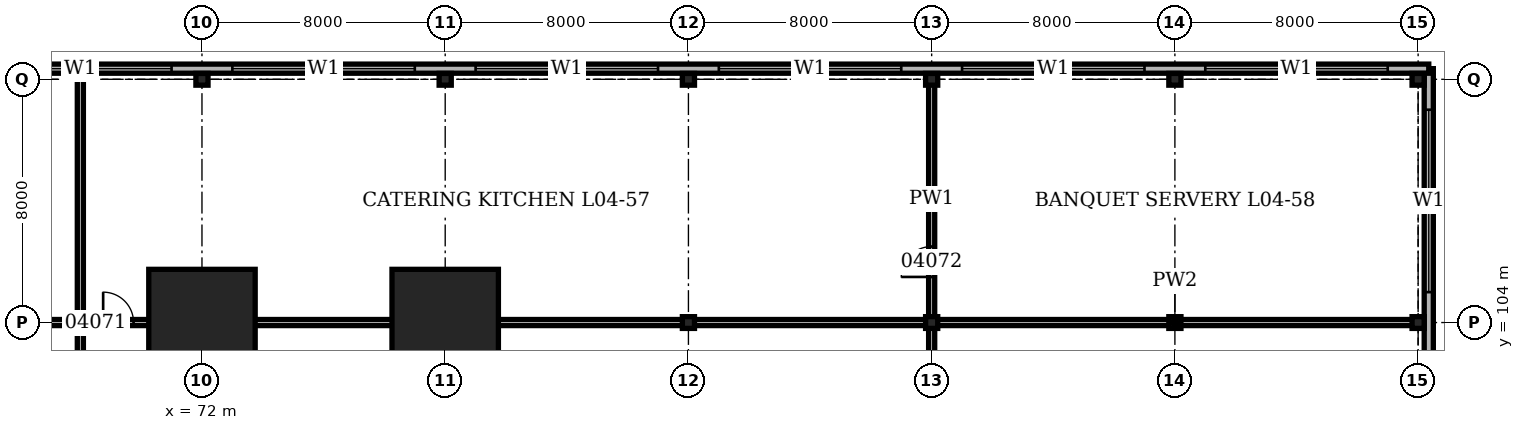
"""IFC4 building model, lengths in metres.
Left out: names, types, materials, properties, quantities, classifications, styles, units other than length and angle.
Written with IfcOpenShell. Run it as: python <this file> out.ifc"""

import sys

from ifc_helpers import new_model, si_unit, direction, frame, frame_2d, origin, origin_2d, place, context, subcontext, project, spatial, rectangle, hollow_rectangle, i_section, extrude, element, fill, save


model = new_model("IFC4")
c1 = context("Model", 3, precision=1e-05, world=origin(), true_north=direction((0.0, 1.0)))
c2 = subcontext(c1, "Body", "Model", "MODEL_VIEW")
j1 = project(units=[si_unit("LENGTHUNIT", "METRE"), si_unit("PLANEANGLEUNIT", "RADIAN")], contexts=[c1])
p1 = place(None, origin())
s1 = spatial("IfcSite", under=j1, at=p1, CompositionType="ELEMENT")
p2 = place(p1, origin())
s2 = spatial("IfcBuilding", under=s1, at=p2, CompositionType="ELEMENT")
p3 = place(p2, frame((0.0, 0.0, 19.9)))
s3 = spatial("IfcBuildingStorey", under=s2, at=p3, CompositionType="ELEMENT", Elevation=19.9)
p4 = place(p3, frame((72.0, 104.0, 0.0), z_axis=(0.0, 0.0, 1.0), x_axis=(1.0, 0.0, 0.0)))
e1 = element("IfcColumn", 1, at=p4, inside=s3, PredefinedType="COLUMN", context=c2, shape_type="SweptSolid", body=[
    extrude(hollow_rectangle(XDim=3.5, YDim=3.5, WallThickness=0.5, at=origin_2d()), origin(), (0.0, 0.0, 1.0), 6.0),
])
p5 = place(p3, frame((72.0, 112.0, 0.0), z_axis=(0.0, 0.0, 1.0), x_axis=(1.0, 0.0, 0.0)))
e2 = element("IfcColumn", 2, at=p5, inside=s3, PredefinedType="COLUMN", context=c2, shape_type="SweptSolid", body=[
    extrude(i_section(OverallWidth=0.399, OverallDepth=0.386, WebThickness=0.021, FlangeThickness=0.033, at=origin_2d()), origin(), (0.0, 0.0, 1.0), 6.0),
])
p6 = place(p3, frame((80.0, 104.0, 0.0), z_axis=(0.0, 0.0, 1.0), x_axis=(1.0, 0.0, 0.0)))
e3 = element("IfcColumn", 3, at=p6, inside=s3, PredefinedType="COLUMN", context=c2, shape_type="SweptSolid", body=[
    extrude(hollow_rectangle(XDim=3.5, YDim=3.5, WallThickness=0.5, at=origin_2d()), origin(), (0.0, 0.0, 1.0), 6.0),
])
for number, where, z_axis, x_axis in (
    (4, (80.0, 112.0, 0.0), (0.0, 0.0, 1.0), (1.0, 0.0, 0.0)),
    (5, (88.0, 104.0, 0.0), (0.0, 0.0, 1.0), (1.0, 0.0, 0.0)),
    (6, (88.0, 112.0, 0.0), (0.0, 0.0, 1.0), (1.0, 0.0, 0.0)),
    (7, (96.0, 104.0, 0.0), (0.0, 0.0, 1.0), (1.0, 0.0, 0.0)),
    (8, (96.0, 112.0, 0.0), (0.0, 0.0, 1.0), (1.0, 0.0, 0.0)),
    (9, (104.0, 104.0, 0.0), (0.0, 0.0, 1.0), (1.0, 0.0, 0.0)),
    (10, (104.0, 112.0, 0.0), (0.0, 0.0, 1.0), (1.0, 0.0, 0.0)),
    (11, (112.0, 104.0, 0.0), (0.0, 0.0, 1.0), (1.0, 0.0, 0.0)),
    (12, (112.0, 112.0, 0.0), (0.0, 0.0, 1.0), (1.0, 0.0, 0.0)),
):
    element("IfcColumn", number, at=place(p3, frame(where, z_axis=z_axis, x_axis=x_axis)), inside=s3, PredefinedType="COLUMN", context=c2, shape_type="SweptSolid", body=[
        extrude(i_section(OverallWidth=0.399, OverallDepth=0.386, WebThickness=0.021, FlangeThickness=0.033, at=origin_2d()), origin(), (0.0, 0.0, 1.0), 6.0),
    ])
p7 = place(p3, frame((112.35, -0.35, 0.0), z_axis=(0.0, 0.0, 1.0), x_axis=(0.0, 1.0, 0.0)))
e13 = element("IfcWall", 13, at=p7, inside=s3, PredefinedType="SOLIDWALL", context=c2, shape_type="SweptSolid", body=[
    extrude(rectangle(XDim=112.7, YDim=0.3, at=frame_2d((56.35, 0.0))), origin(), (0.0, 0.0, 1.0), 6.0),
])
p8 = place(p7, frame((1.35, 0.0, 1.0)))
e14 = element("IfcOpeningElement", 14, at=p8, cuts=e13, PredefinedType="OPENING", context=c2, shape_type="SweptSolid", body=[
    extrude(rectangle(XDim=6.0, YDim=1.5, at=frame_2d((3.0, 0.75))), frame((0.0, 0.16, 0.0), z_axis=(0.0, -1.0, 0.0), x_axis=(1.0, 0.0, 0.0)), (0.0, 0.0, 1.0), 0.32),
])
p9 = place(p7, frame((9.35, 0.0, 1.0)))
e15 = element("IfcOpeningElement", 15, at=p9, cuts=e13, PredefinedType="OPENING", context=c2, shape_type="SweptSolid", body=[
    extrude(rectangle(XDim=6.0, YDim=1.5, at=frame_2d((3.0, 0.75))), frame((0.0, 0.16, 0.0), z_axis=(0.0, -1.0, 0.0), x_axis=(1.0, 0.0, 0.0)), (0.0, 0.0, 1.0), 0.32),
])
p10 = place(p7, frame((17.35, 0.0, 1.0)))
e16 = element("IfcOpeningElement", 16, at=p10, cuts=e13, PredefinedType="OPENING", context=c2, shape_type="SweptSolid", body=[
    extrude(rectangle(XDim=6.0, YDim=1.5, at=frame_2d((3.0, 0.75))), frame((0.0, 0.16, 0.0), z_axis=(0.0, -1.0, 0.0), x_axis=(1.0, 0.0, 0.0)), (0.0, 0.0, 1.0), 0.32),
])
p11 = place(p7, frame((25.35, 0.0, 1.0)))
e17 = element("IfcOpeningElement", 17, at=p11, cuts=e13, PredefinedType="OPENING", context=c2, shape_type="SweptSolid", body=[
    extrude(rectangle(XDim=6.0, YDim=1.5, at=frame_2d((3.0, 0.75))), frame((0.0, 0.16, 0.0), z_axis=(0.0, -1.0, 0.0), x_axis=(1.0, 0.0, 0.0)), (0.0, 0.0, 1.0), 0.32),
])
p12 = place(p7, frame((33.35, 0.0, 1.0)))
e18 = element("IfcOpeningElement", 18, at=p12, cuts=e13, PredefinedType="OPENING", context=c2, shape_type="SweptSolid", body=[
    extrude(rectangle(XDim=6.0, YDim=1.5, at=frame_2d((3.0, 0.75))), frame((0.0, 0.16, 0.0), z_axis=(0.0, -1.0, 0.0), x_axis=(1.0, 0.0, 0.0)), (0.0, 0.0, 1.0), 0.32),
])
p13 = place(p7, frame((41.35, 0.0, 1.0)))
e19 = element("IfcOpeningElement", 19, at=p13, cuts=e13, PredefinedType="OPENING", context=c2, shape_type="SweptSolid", body=[
    extrude(rectangle(XDim=6.0, YDim=1.5, at=frame_2d((3.0, 0.75))), frame((0.0, 0.16, 0.0), z_axis=(0.0, -1.0, 0.0), x_axis=(1.0, 0.0, 0.0)), (0.0, 0.0, 1.0), 0.32),
])
p14 = place(p7, frame((49.35, 0.0, 1.0)))
e20 = element("IfcOpeningElement", 20, at=p14, cuts=e13, PredefinedType="OPENING", context=c2, shape_type="SweptSolid", body=[
    extrude(rectangle(XDim=6.0, YDim=1.5, at=frame_2d((3.0, 0.75))), frame((0.0, 0.16, 0.0), z_axis=(0.0, -1.0, 0.0), x_axis=(1.0, 0.0, 0.0)), (0.0, 0.0, 1.0), 0.32),
])
p15 = place(p7, frame((57.35, 0.0, 1.0)))
e21 = element("IfcOpeningElement", 21, at=p15, cuts=e13, PredefinedType="OPENING", context=c2, shape_type="SweptSolid", body=[
    extrude(rectangle(XDim=6.0, YDim=1.5, at=frame_2d((3.0, 0.75))), frame((0.0, 0.16, 0.0), z_axis=(0.0, -1.0, 0.0), x_axis=(1.0, 0.0, 0.0)), (0.0, 0.0, 1.0), 0.32),
])
p16 = place(p7, frame((65.35, 0.0, 1.0)))
e22 = element("IfcOpeningElement", 22, at=p16, cuts=e13, PredefinedType="OPENING", context=c2, shape_type="SweptSolid", body=[
    extrude(rectangle(XDim=6.0, YDim=1.5, at=frame_2d((3.0, 0.75))), frame((0.0, 0.16, 0.0), z_axis=(0.0, -1.0, 0.0), x_axis=(1.0, 0.0, 0.0)), (0.0, 0.0, 1.0), 0.32),
])
p17 = place(p7, frame((73.35, 0.0, 1.0)))
e23 = element("IfcOpeningElement", 23, at=p17, cuts=e13, PredefinedType="OPENING", context=c2, shape_type="SweptSolid", body=[
    extrude(rectangle(XDim=6.0, YDim=1.5, at=frame_2d((3.0, 0.75))), frame((0.0, 0.16, 0.0), z_axis=(0.0, -1.0, 0.0), x_axis=(1.0, 0.0, 0.0)), (0.0, 0.0, 1.0), 0.32),
])
p18 = place(p7, frame((81.35, 0.0, 1.0)))
e24 = element("IfcOpeningElement", 24, at=p18, cuts=e13, PredefinedType="OPENING", context=c2, shape_type="SweptSolid", body=[
    extrude(rectangle(XDim=6.0, YDim=1.5, at=frame_2d((3.0, 0.75))), frame((0.0, 0.16, 0.0), z_axis=(0.0, -1.0, 0.0), x_axis=(1.0, 0.0, 0.0)), (0.0, 0.0, 1.0), 0.32),
])
p19 = place(p7, frame((89.35, 0.0, 1.0)))
e25 = element("IfcOpeningElement", 25, at=p19, cuts=e13, PredefinedType="OPENING", context=c2, shape_type="SweptSolid", body=[
    extrude(rectangle(XDim=6.0, YDim=1.5, at=frame_2d((3.0, 0.75))), frame((0.0, 0.16, 0.0), z_axis=(0.0, -1.0, 0.0), x_axis=(1.0, 0.0, 0.0)), (0.0, 0.0, 1.0), 0.32),
])
p20 = place(p7, frame((97.35, 0.0, 1.0)))
e26 = element("IfcOpeningElement", 26, at=p20, cuts=e13, PredefinedType="OPENING", context=c2, shape_type="SweptSolid", body=[
    extrude(rectangle(XDim=6.0, YDim=1.5, at=frame_2d((3.0, 0.75))), frame((0.0, 0.16, 0.0), z_axis=(0.0, -1.0, 0.0), x_axis=(1.0, 0.0, 0.0)), (0.0, 0.0, 1.0), 0.32),
])
p21 = place(p7, frame((105.35, 0.0, 1.0)))
e27 = element("IfcOpeningElement", 27, at=p21, cuts=e13, PredefinedType="OPENING", context=c2, shape_type="SweptSolid", body=[
    extrude(rectangle(XDim=6.0, YDim=1.5, at=frame_2d((3.0, 0.75))), frame((0.0, 0.16, 0.0), z_axis=(0.0, -1.0, 0.0), x_axis=(1.0, 0.0, 0.0)), (0.0, 0.0, 1.0), 0.32),
])
p22 = place(p3, frame((112.35, 112.35, 0.0), z_axis=(0.0, 0.0, 1.0), x_axis=(-1.0, 0.0, 0.0)))
e28 = element("IfcWall", 28, at=p22, inside=s3, PredefinedType="SOLIDWALL", context=c2, shape_type="SweptSolid", body=[
    extrude(rectangle(XDim=112.7, YDim=0.3, at=frame_2d((56.35, 0.0))), origin(), (0.0, 0.0, 1.0), 6.0),
])
p23 = place(p22, frame((1.35, 0.0, 1.0)))
e29 = element("IfcOpeningElement", 29, at=p23, cuts=e28, PredefinedType="OPENING", context=c2, shape_type="SweptSolid", body=[
    extrude(rectangle(XDim=6.0, YDim=1.5, at=frame_2d((3.0, 0.75))), frame((0.0, 0.16, 0.0), z_axis=(0.0, -1.0, 0.0), x_axis=(1.0, 0.0, 0.0)), (0.0, 0.0, 1.0), 0.32),
])
p24 = place(p22, frame((9.35, 0.0, 1.0)))
e30 = element("IfcOpeningElement", 30, at=p24, cuts=e28, PredefinedType="OPENING", context=c2, shape_type="SweptSolid", body=[
    extrude(rectangle(XDim=6.0, YDim=1.5, at=frame_2d((3.0, 0.75))), frame((0.0, 0.16, 0.0), z_axis=(0.0, -1.0, 0.0), x_axis=(1.0, 0.0, 0.0)), (0.0, 0.0, 1.0), 0.32),
])
p25 = place(p22, frame((17.35, 0.0, 1.0)))
e31 = element("IfcOpeningElement", 31, at=p25, cuts=e28, PredefinedType="OPENING", context=c2, shape_type="SweptSolid", body=[
    extrude(rectangle(XDim=6.0, YDim=1.5, at=frame_2d((3.0, 0.75))), frame((0.0, 0.16, 0.0), z_axis=(0.0, -1.0, 0.0), x_axis=(1.0, 0.0, 0.0)), (0.0, 0.0, 1.0), 0.32),
])
p26 = place(p22, frame((25.35, 0.0, 1.0)))
e32 = element("IfcOpeningElement", 32, at=p26, cuts=e28, PredefinedType="OPENING", context=c2, shape_type="SweptSolid", body=[
    extrude(rectangle(XDim=6.0, YDim=1.5, at=frame_2d((3.0, 0.75))), frame((0.0, 0.16, 0.0), z_axis=(0.0, -1.0, 0.0), x_axis=(1.0, 0.0, 0.0)), (0.0, 0.0, 1.0), 0.32),
])
p27 = place(p22, frame((33.35, 0.0, 1.0)))
e33 = element("IfcOpeningElement", 33, at=p27, cuts=e28, PredefinedType="OPENING", context=c2, shape_type="SweptSolid", body=[
    extrude(rectangle(XDim=6.0, YDim=1.5, at=frame_2d((3.0, 0.75))), frame((0.0, 0.16, 0.0), z_axis=(0.0, -1.0, 0.0), x_axis=(1.0, 0.0, 0.0)), (0.0, 0.0, 1.0), 0.32),
])
p28 = place(p22, frame((41.35, 0.0, 1.0)))
e34 = element("IfcOpeningElement", 34, at=p28, cuts=e28, PredefinedType="OPENING", context=c2, shape_type="SweptSolid", body=[
    extrude(rectangle(XDim=6.0, YDim=1.5, at=frame_2d((3.0, 0.75))), frame((0.0, 0.16, 0.0), z_axis=(0.0, -1.0, 0.0), x_axis=(1.0, 0.0, 0.0)), (0.0, 0.0, 1.0), 0.32),
])
p29 = place(p22, frame((49.35, 0.0, 1.0)))
e35 = element("IfcOpeningElement", 35, at=p29, cuts=e28, PredefinedType="OPENING", context=c2, shape_type="SweptSolid", body=[
    extrude(rectangle(XDim=6.0, YDim=1.5, at=frame_2d((3.0, 0.75))), frame((0.0, 0.16, 0.0), z_axis=(0.0, -1.0, 0.0), x_axis=(1.0, 0.0, 0.0)), (0.0, 0.0, 1.0), 0.32),
])
p30 = place(p22, frame((57.35, 0.0, 1.0)))
e36 = element("IfcOpeningElement", 36, at=p30, cuts=e28, PredefinedType="OPENING", context=c2, shape_type="SweptSolid", body=[
    extrude(rectangle(XDim=6.0, YDim=1.5, at=frame_2d((3.0, 0.75))), frame((0.0, 0.16, 0.0), z_axis=(0.0, -1.0, 0.0), x_axis=(1.0, 0.0, 0.0)), (0.0, 0.0, 1.0), 0.32),
])
p31 = place(p22, frame((65.35, 0.0, 1.0)))
e37 = element("IfcOpeningElement", 37, at=p31, cuts=e28, PredefinedType="OPENING", context=c2, shape_type="SweptSolid", body=[
    extrude(rectangle(XDim=6.0, YDim=1.5, at=frame_2d((3.0, 0.75))), frame((0.0, 0.16, 0.0), z_axis=(0.0, -1.0, 0.0), x_axis=(1.0, 0.0, 0.0)), (0.0, 0.0, 1.0), 0.32),
])
p32 = place(p22, frame((73.35, 0.0, 1.0)))
e38 = element("IfcOpeningElement", 38, at=p32, cuts=e28, PredefinedType="OPENING", context=c2, shape_type="SweptSolid", body=[
    extrude(rectangle(XDim=6.0, YDim=1.5, at=frame_2d((3.0, 0.75))), frame((0.0, 0.16, 0.0), z_axis=(0.0, -1.0, 0.0), x_axis=(1.0, 0.0, 0.0)), (0.0, 0.0, 1.0), 0.32),
])
p33 = place(p22, frame((81.35, 0.0, 1.0)))
e39 = element("IfcOpeningElement", 39, at=p33, cuts=e28, PredefinedType="OPENING", context=c2, shape_type="SweptSolid", body=[
    extrude(rectangle(XDim=6.0, YDim=1.5, at=frame_2d((3.0, 0.75))), frame((0.0, 0.16, 0.0), z_axis=(0.0, -1.0, 0.0), x_axis=(1.0, 0.0, 0.0)), (0.0, 0.0, 1.0), 0.32),
])
p34 = place(p22, frame((89.35, 0.0, 1.0)))
e40 = element("IfcOpeningElement", 40, at=p34, cuts=e28, PredefinedType="OPENING", context=c2, shape_type="SweptSolid", body=[
    extrude(rectangle(XDim=6.0, YDim=1.5, at=frame_2d((3.0, 0.75))), frame((0.0, 0.16, 0.0), z_axis=(0.0, -1.0, 0.0), x_axis=(1.0, 0.0, 0.0)), (0.0, 0.0, 1.0), 0.32),
])
p35 = place(p22, frame((97.35, 0.0, 1.0)))
e41 = element("IfcOpeningElement", 41, at=p35, cuts=e28, PredefinedType="OPENING", context=c2, shape_type="SweptSolid", body=[
    extrude(rectangle(XDim=6.0, YDim=1.5, at=frame_2d((3.0, 0.75))), frame((0.0, 0.16, 0.0), z_axis=(0.0, -1.0, 0.0), x_axis=(1.0, 0.0, 0.0)), (0.0, 0.0, 1.0), 0.32),
])
p36 = place(p22, frame((105.35, 0.0, 1.0)))
e42 = element("IfcOpeningElement", 42, at=p36, cuts=e28, PredefinedType="OPENING", context=c2, shape_type="SweptSolid", body=[
    extrude(rectangle(XDim=6.0, YDim=1.5, at=frame_2d((3.0, 0.75))), frame((0.0, 0.16, 0.0), z_axis=(0.0, -1.0, 0.0), x_axis=(1.0, 0.0, 0.0)), (0.0, 0.0, 1.0), 0.32),
])
p37 = place(p3, frame((24.1, 104.0, 0.0), z_axis=(0.0, 0.0, 1.0), x_axis=(1.0, 0.0, 0.0)))
e43 = element("IfcWall", 43, at=p37, inside=s3, PredefinedType="PARTITIONING", context=c2, shape_type="SweptSolid", body=[
    extrude(rectangle(XDim=71.9, YDim=0.2, at=frame_2d((35.95, 0.0))), origin(), (0.0, 0.0, 1.0), 4.978),
])
p38 = place(p37, frame((1.0, 0.0, 0.0)))
e44 = element("IfcOpeningElement", 44, at=p38, cuts=e43, PredefinedType="OPENING", context=c2, shape_type="SweptSolid", body=[
    extrude(rectangle(XDim=1.8, YDim=2.4, at=frame_2d((0.9, 1.2))), frame((0.0, 0.11, 0.0), z_axis=(0.0, -1.0, 0.0), x_axis=(1.0, 0.0, 0.0)), (0.0, 0.0, 1.0), 0.22),
])
p39 = place(p37, frame((26.0, 0.0, 0.0)))
e45 = element("IfcOpeningElement", 45, at=p39, cuts=e43, PredefinedType="OPENING", context=c2, shape_type="SweptSolid", body=[
    extrude(rectangle(XDim=1.8, YDim=2.4, at=frame_2d((0.9, 1.2))), frame((0.0, 0.11, 0.0), z_axis=(0.0, -1.0, 0.0), x_axis=(1.0, 0.0, 0.0)), (0.0, 0.0, 1.0), 0.22),
])
p40 = place(p37, frame((34.0, 0.0, 0.0)))
e46 = element("IfcOpeningElement", 46, at=p40, cuts=e43, PredefinedType="OPENING", context=c2, shape_type="SweptSolid", body=[
    extrude(rectangle(XDim=1.8, YDim=2.4, at=frame_2d((0.9, 1.2))), frame((0.0, 0.11, 0.0), z_axis=(0.0, -1.0, 0.0), x_axis=(1.0, 0.0, 0.0)), (0.0, 0.0, 1.0), 0.22),
])
p41 = place(p37, frame((44.65, 0.0, 0.0)))
e47 = element("IfcOpeningElement", 47, at=p41, cuts=e43, PredefinedType="OPENING", context=c2, shape_type="SweptSolid", body=[
    extrude(rectangle(XDim=1.0, YDim=2.1, at=frame_2d((0.5, 1.05))), frame((0.0, 0.11, 0.0), z_axis=(0.0, -1.0, 0.0), x_axis=(1.0, 0.0, 0.0)), (0.0, 0.0, 1.0), 0.22),
])
p42 = place(p3, frame((96.0, 104.0, 0.0), z_axis=(0.0, 0.0, 1.0), x_axis=(1.0, 0.0, 0.0)))
e48 = element("IfcWall", 48, at=p42, inside=s3, PredefinedType="PARTITIONING", context=c2, shape_type="SweptSolid", body=[
    extrude(rectangle(XDim=16.0, YDim=0.2, at=frame_2d((8.0, 0.0))), origin(), (0.0, 0.0, 1.0), 4.978),
])
p43 = place(p3, frame((68.0, 92.6, 0.0), z_axis=(0.0, 0.0, 1.0), x_axis=(0.0, 1.0, 0.0)))
e49 = element("IfcWall", 49, at=p43, inside=s3, PredefinedType="PARTITIONING", context=c2, shape_type="SweptSolid", body=[
    extrude(rectangle(XDim=19.55, YDim=0.2, at=frame_2d((9.775, 0.0))), origin(), (0.0, 0.0, 1.0), 5.75),
])
p44 = place(p3, frame((96.0, 88.0, 0.0), z_axis=(0.0, 0.0, 1.0), x_axis=(0.0, 1.0, 0.0)))
e50 = element("IfcWall", 50, at=p44, inside=s3, PredefinedType="PARTITIONING", context=c2, shape_type="SweptSolid", body=[
    extrude(rectangle(XDim=16.0, YDim=0.2, at=frame_2d((8.0, 0.0))), origin(), (0.0, 0.0, 1.0), 4.978),
])
p45 = place(p3, frame((96.0, 104.0, 0.0), z_axis=(0.0, 0.0, 1.0), x_axis=(0.0, 1.0, 0.0)))
e51 = element("IfcWall", 51, at=p45, inside=s3, PredefinedType="PARTITIONING", context=c2, shape_type="SweptSolid", body=[
    extrude(rectangle(XDim=8.15, YDim=0.2, at=frame_2d((4.075, 0.0))), origin(), (0.0, 0.0, 1.0), 4.978),
])
p46 = place(p45, frame((1.5, 0.0, 0.0)))
e52 = element("IfcOpeningElement", 52, at=p46, cuts=e51, PredefinedType="OPENING", context=c2, shape_type="SweptSolid", body=[
    extrude(rectangle(XDim=1.0, YDim=2.1, at=frame_2d((0.5, 1.05))), frame((0.0, 0.11, 0.0), z_axis=(0.0, -1.0, 0.0), x_axis=(1.0, 0.0, 0.0)), (0.0, 0.0, 1.0), 0.22),
])
p47 = place(p21, origin())
e53 = element("IfcWindow", 53, at=p47, inside=s3, PartitioningType="SINGLE_PANEL", PredefinedType="WINDOW", context=c2, shape_type="SweptSolid", body=[
    extrude(rectangle(XDim=6.0, YDim=1.5, at=frame_2d((3.0, 0.75))), frame((0.0, 0.03, 0.0), z_axis=(0.0, -1.0, 0.0), x_axis=(1.0, 0.0, 0.0)), (0.0, 0.0, 1.0), 0.06),
])
fill(e27, e53)
p48 = place(p23, origin())
e54 = element("IfcWindow", 54, at=p48, inside=s3, PartitioningType="SINGLE_PANEL", PredefinedType="WINDOW", context=c2, shape_type="SweptSolid", body=[
    extrude(rectangle(XDim=6.0, YDim=1.5, at=frame_2d((3.0, 0.75))), frame((0.0, 0.03, 0.0), z_axis=(0.0, -1.0, 0.0), x_axis=(1.0, 0.0, 0.0)), (0.0, 0.0, 1.0), 0.06),
])
fill(e29, e54)
p49 = place(p24, origin())
e55 = element("IfcWindow", 55, at=p49, inside=s3, PartitioningType="SINGLE_PANEL", PredefinedType="WINDOW", context=c2, shape_type="SweptSolid", body=[
    extrude(rectangle(XDim=6.0, YDim=1.5, at=frame_2d((3.0, 0.75))), frame((0.0, 0.03, 0.0), z_axis=(0.0, -1.0, 0.0), x_axis=(1.0, 0.0, 0.0)), (0.0, 0.0, 1.0), 0.06),
])
fill(e30, e55)
p50 = place(p25, origin())
e56 = element("IfcWindow", 56, at=p50, inside=s3, PartitioningType="SINGLE_PANEL", PredefinedType="WINDOW", context=c2, shape_type="SweptSolid", body=[
    extrude(rectangle(XDim=6.0, YDim=1.5, at=frame_2d((3.0, 0.75))), frame((0.0, 0.03, 0.0), z_axis=(0.0, -1.0, 0.0), x_axis=(1.0, 0.0, 0.0)), (0.0, 0.0, 1.0), 0.06),
])
fill(e31, e56)
p51 = place(p26, origin())
e57 = element("IfcWindow", 57, at=p51, inside=s3, PartitioningType="SINGLE_PANEL", PredefinedType="WINDOW", context=c2, shape_type="SweptSolid", body=[
    extrude(rectangle(XDim=6.0, YDim=1.5, at=frame_2d((3.0, 0.75))), frame((0.0, 0.03, 0.0), z_axis=(0.0, -1.0, 0.0), x_axis=(1.0, 0.0, 0.0)), (0.0, 0.0, 1.0), 0.06),
])
fill(e32, e57)
p52 = place(p27, origin())
e58 = element("IfcWindow", 58, at=p52, inside=s3, PartitioningType="SINGLE_PANEL", PredefinedType="WINDOW", context=c2, shape_type="SweptSolid", body=[
    extrude(rectangle(XDim=6.0, YDim=1.5, at=frame_2d((3.0, 0.75))), frame((0.0, 0.03, 0.0), z_axis=(0.0, -1.0, 0.0), x_axis=(1.0, 0.0, 0.0)), (0.0, 0.0, 1.0), 0.06),
])
fill(e33, e58)
p53 = place(p28, origin())
e59 = element("IfcWindow", 59, at=p53, inside=s3, PartitioningType="SINGLE_PANEL", PredefinedType="WINDOW", context=c2, shape_type="SweptSolid", body=[
    extrude(rectangle(XDim=6.0, YDim=1.5, at=frame_2d((3.0, 0.75))), frame((0.0, 0.03, 0.0), z_axis=(0.0, -1.0, 0.0), x_axis=(1.0, 0.0, 0.0)), (0.0, 0.0, 1.0), 0.06),
])
fill(e34, e59)
p54 = place(p41, origin())
e60 = element("IfcDoor", 60, at=p54, inside=s3, OperationType="SINGLE_SWING_LEFT", PredefinedType="DOOR", context=c2, shape_type="SweptSolid", body=[
    extrude(rectangle(XDim=1.0, YDim=2.1, at=frame_2d((0.5, 1.05))), frame((0.0, 0.1, 0.0), z_axis=(0.0, -1.0, 0.0), x_axis=(1.0, 0.0, 0.0)), (0.0, 0.0, 1.0), 0.199),
])
fill(e47, e60)
p55 = place(p46, origin())
e61 = element("IfcDoor", 61, at=p55, inside=s3, OperationType="SINGLE_SWING_LEFT", PredefinedType="DOOR", context=c2, shape_type="SweptSolid", body=[
    extrude(rectangle(XDim=1.0, YDim=2.1, at=frame_2d((0.5, 1.05))), frame((0.0, 0.1, 0.0), z_axis=(0.0, -1.0, 0.0), x_axis=(1.0, 0.0, 0.0)), (0.0, 0.0, 1.0), 0.199),
])
fill(e52, e61)
save(model, sys.argv[1])
